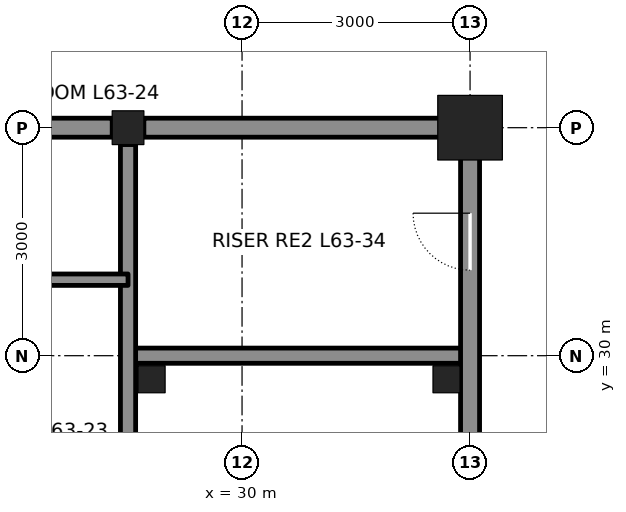
"""IFC4 building model, lengths in metres.
Left out: names, types, materials, properties, quantities, classifications, styles, units other than length and angle.
Written with IfcOpenShell. Run it as: python <this file> out.ifc"""

import sys

from ifc_helpers import new_model, si_unit, direction, frame, frame_2d, origin, origin_2d, place, context, subcontext, project, spatial, rectangle, hollow_rectangle, i_section, extrude, element, fill, save


model = new_model("IFC4")
c1 = context("Model", 3, precision=1e-05, world=origin(), true_north=direction((0.0, 1.0)))
c2 = subcontext(c1, "Body", "Model", "MODEL_VIEW")
j1 = project(units=[si_unit("LENGTHUNIT", "METRE"), si_unit("PLANEANGLEUNIT", "RADIAN")], contexts=[c1])
p1 = place(None, origin())
s1 = spatial("IfcSite", under=j1, at=p1, CompositionType="ELEMENT")
p2 = place(p1, origin())
s2 = spatial("IfcBuilding", under=s1, at=p2, CompositionType="ELEMENT")
p3 = place(p2, frame((0.0, 0.0, 283.2)))
s3 = spatial("IfcBuildingStorey", under=s2, at=p3, CompositionType="ELEMENT", Elevation=283.2)
p4 = place(p3, frame((28.5, 33.0, 0.0), z_axis=(0.0, 0.0, 1.0), x_axis=(1.0, 0.0, 0.0)))
e1 = element("IfcColumn", 1, at=p4, inside=s3, PredefinedType="COLUMN", context=c2, shape_type="SweptSolid", body=[
    extrude(i_section(OverallWidth=0.417, OverallDepth=0.445, WebThickness=0.039, FlangeThickness=0.063, at=origin_2d()), origin(), (0.0, 0.0, 1.0), 4.2),
])
p5 = place(p3, frame((33.0, 33.0, 0.0), z_axis=(0.0, 0.0, 1.0), x_axis=(1.0, 0.0, 0.0)))
e2 = element("IfcColumn", 2, at=p5, inside=s3, PredefinedType="COLUMN", context=c2, shape_type="SweptSolid", body=[
    extrude(hollow_rectangle(XDim=0.85, YDim=0.85, WallThickness=0.085, at=origin_2d()), origin(), (0.0, 0.0, 1.0), 4.2),
])
p6 = place(p3, frame((28.5, 30.0, 0.0), z_axis=(0.0, 0.0, 1.0), x_axis=(1.0, 0.0, 0.0)))
e3 = element("IfcWall", 3, at=p6, inside=s3, PredefinedType="SOLIDWALL", context=c2, shape_type="SweptSolid", body=[
    extrude(rectangle(XDim=4.5, YDim=0.2, at=frame_2d((2.25, 0.0))), origin(), (0.0, 0.0, 1.0), 4.04),
])
p7 = place(p3, frame((25.708, 33.0, 0.0), z_axis=(0.0, 0.0, 1.0), x_axis=(1.0, 0.0, 0.0)))
e4 = element("IfcWall", 4, at=p7, inside=s3, PredefinedType="SOLIDWALL", context=c2, shape_type="SweptSolid", body=[
    extrude(rectangle(XDim=2.583, YDim=0.25, at=frame_2d((1.292, 0.0))), origin(), (0.0, 0.0, 1.0), 3.182),
])
p8 = place(p3, frame((28.708, 33.0, 0.0), z_axis=(0.0, 0.0, 1.0), x_axis=(1.0, 0.0, 0.0)))
e5 = element("IfcWall", 5, at=p8, inside=s3, PredefinedType="SOLIDWALL", context=c2, shape_type="SweptSolid", body=[
    extrude(rectangle(XDim=4.042, YDim=0.25, at=frame_2d((2.021, 0.0))), origin(), (0.0, 0.0, 1.0), 3.182),
])
p9 = place(p3, frame((28.5, 24.222, 0.0), z_axis=(0.0, 0.0, 1.0), x_axis=(0.0, 1.0, 0.0)))
e6 = element("IfcWall", 6, at=p9, inside=s3, PredefinedType="SOLIDWALL", context=c2, shape_type="SweptSolid", body=[
    extrude(rectangle(XDim=8.555, YDim=0.2, at=frame_2d((4.278, 0.0))), origin(), (0.0, 0.0, 1.0), 3.113),
])
p10 = place(p3, frame((33.0, 24.222, 0.0), z_axis=(0.0, 0.0, 1.0), x_axis=(0.0, 1.0, 0.0)))
e7 = element("IfcWall", 7, at=p10, inside=s3, PredefinedType="SOLIDWALL", context=c2, shape_type="SweptSolid", body=[
    extrude(rectangle(XDim=8.528, YDim=0.25, at=frame_2d((4.264, 0.0))), origin(), (0.0, 0.0, 1.0), 3.113),
])
p11 = place(p10, frame((6.903, 0.0, 0.0)))
e8 = element("IfcOpeningElement", 8, at=p11, cuts=e7, PredefinedType="OPENING", context=c2, shape_type="SweptSolid", body=[
    extrude(rectangle(XDim=0.75, YDim=2.1, at=frame_2d((0.375, 1.05))), frame((0.0, 0.135, 0.0), z_axis=(0.0, -1.0, 0.0), x_axis=(1.0, 0.0, 0.0)), (0.0, 0.0, 1.0), 0.27),
])
p12 = place(p3, frame((25.5, 31.0, 0.0), z_axis=(0.0, 0.0, 1.0), x_axis=(1.0, 0.0, 0.0)))
e9 = element("IfcWall", 9, at=p12, inside=s3, PredefinedType="PARTITIONING", context=c2, shape_type="SweptSolid", body=[
    extrude(rectangle(XDim=3.0, YDim=0.15, at=frame_2d((1.5, 0.0))), origin(), (0.0, 0.0, 1.0), 4.04),
])
for number, where, z_axis, x_axis in (
    (10, (28.81, 29.69, 0.0), (0.0, 0.0, 1.0), (1.0, 0.0, 0.0)),
    (11, (32.69, 29.69, 0.0), (0.0, 0.0, 1.0), (1.0, 0.0, 0.0)),
):
    element("IfcColumn", number, at=place(p3, frame(where, z_axis=z_axis, x_axis=x_axis)), inside=s3, PredefinedType="COLUMN", context=c2, shape_type="SweptSolid", body=[
        extrude(hollow_rectangle(XDim=0.356, YDim=0.356, WallThickness=0.009, at=origin_2d()), origin(), (0.0, 0.0, 1.0), 4.2),
    ])
p13 = place(p11, origin())
e12 = element("IfcDoor", 12, at=p13, inside=s3, OperationType="SINGLE_SWING_RIGHT", PredefinedType="DOOR", context=c2, shape_type="SweptSolid", body=[
    extrude(rectangle(XDim=0.75, YDim=2.1, at=frame_2d((0.375, 1.05))), frame((0.0, 0.025, 0.0), z_axis=(0.0, -1.0, 0.0), x_axis=(1.0, 0.0, 0.0)), (0.0, 0.0, 1.0), 0.05),
])
fill(e8, e12)
save(model, sys.argv[1])
